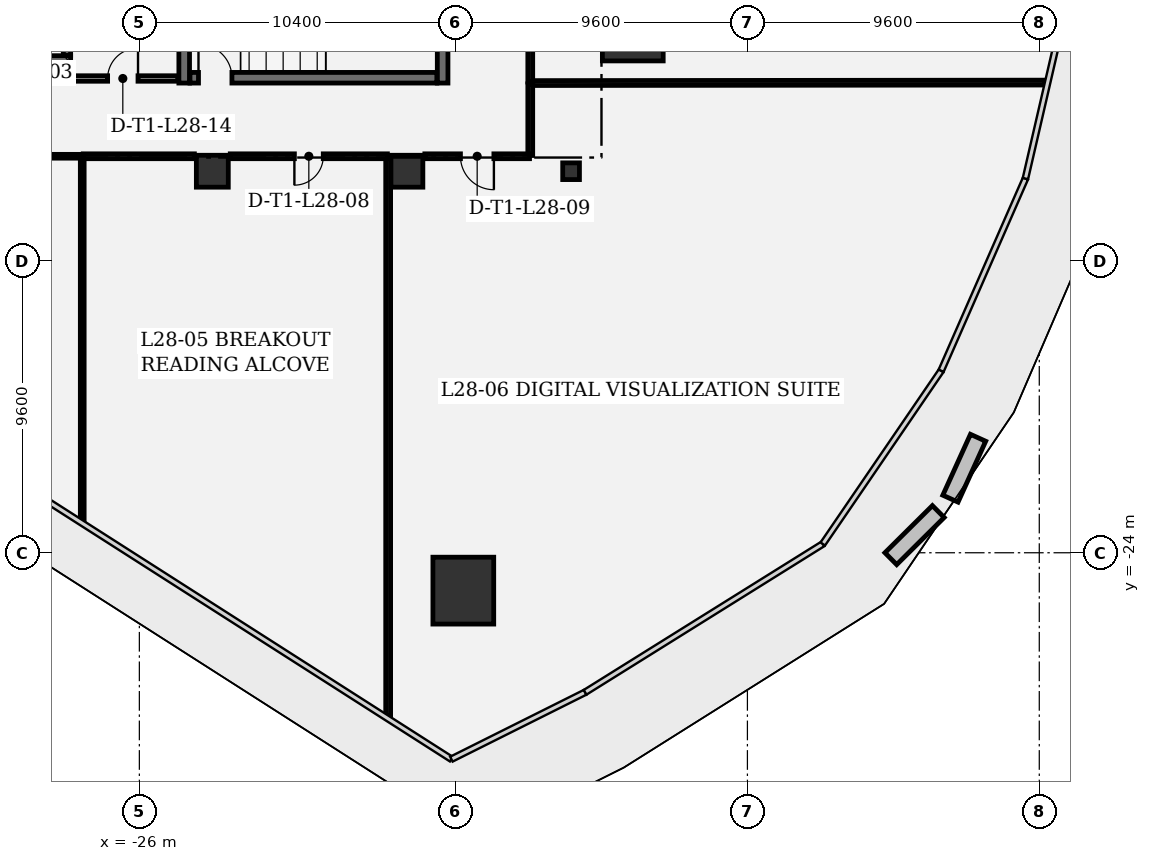
"""IFC4 building model, lengths in metres.
Left out: names, types, materials, properties, quantities, classifications, styles, units other than length and angle.
Written with IfcOpenShell. Run it as: python <this file> out.ifc"""

import sys

from ifc_helpers import new_model, si_unit, direction, frame, frame_2d, origin, origin_2d, place, context, subcontext, project, spatial, rectangle, extrude, element, fill, save


model = new_model("IFC4")
c1 = context("Model", 3, precision=1e-05, world=origin(), true_north=direction((0.0, 1.0)))
c2 = subcontext(c1, "Body", "Model", "MODEL_VIEW")
j1 = project(units=[si_unit("LENGTHUNIT", "METRE"), si_unit("PLANEANGLEUNIT", "RADIAN")], contexts=[c1])
p1 = place(None, origin())
s1 = spatial("IfcSite", under=j1, at=p1, CompositionType="ELEMENT")
p2 = place(p1, origin())
s2 = spatial("IfcBuilding", under=s1, at=p2, CompositionType="ELEMENT")
p3 = place(p2, frame((0.0, 0.0, 126.0)))
s3 = spatial("IfcBuildingStorey", under=s2, at=p3, CompositionType="ELEMENT", Elevation=126.0)
for number, where, z_axis, x_axis in (
    (1, (-15.344, -25.246, 0.0), (0.0, 0.0, 1.0), (1.0, 0.0, 0.0)),
    (2, (-9.77, -6.721, 0.0), (0.0, 0.0, 1.0), (1.0, 0.0, 0.0)),
):
    element("IfcColumn", number, at=place(p3, frame(where, z_axis=z_axis, x_axis=x_axis)), inside=s3, PredefinedType="COLUMN", context=c2, shape_type="SweptSolid", body=[
        extrude(rectangle(XDim=2.0, YDim=2.2, at=origin_2d()), origin(), (0.0, 0.0, 1.0), 4.05),
    ])
for number, where, z_axis, x_axis in (
    (3, (-17.2, -11.45, 0.0), (0.0, 0.0, 1.0), (1.0, 0.0, 0.0)),
    (4, (-23.6, -11.45, 0.0), (0.0, 0.0, 1.0), (1.0, 0.0, 0.0)),
):
    element("IfcColumn", number, at=place(p3, frame(where, z_axis=z_axis, x_axis=x_axis)), inside=s3, PredefinedType="COLUMN", context=c2, shape_type="SweptSolid", body=[
        extrude(rectangle(XDim=1.05, YDim=1.05, at=origin_2d()), origin(), (0.0, 0.0, 1.0), 4.05),
    ])
p4 = place(p3, frame((-11.8, -11.45, 0.0), z_axis=(0.0, 0.0, 1.0), x_axis=(1.0, 0.0, 0.0)))
e5 = element("IfcColumn", 5, at=p4, inside=s3, PredefinedType="COLUMN", context=c2, shape_type="SweptSolid", body=[
    extrude(rectangle(XDim=0.55, YDim=0.55, at=origin_2d()), origin(), (0.0, 0.0, 1.0), 4.05),
])
for number, where, z_axis, x_axis in (
    (6, (-24.525, -4.34, 0.0), (0.0, 0.0, 1.0), (0.0, -1.0, 0.0)),
    (7, (-16.025, -8.55, 0.0), (0.0, 0.0, 1.0), (0.0, 1.0, 0.0)),
):
    element("IfcWall", number, at=place(p3, frame(where, z_axis=z_axis, x_axis=x_axis)), inside=s3, PredefinedType="SHEAR", context=c2, shape_type="SweptSolid", body=[
        extrude(rectangle(XDim=4.21, YDim=0.35, at=frame_2d((2.105, 0.0))), origin(), (0.0, 0.0, 1.0), 3.77),
    ])
p5 = place(p3, frame((-24.335, -8.375, 0.0), z_axis=(0.0, 0.0, 1.0), x_axis=(1.0, 0.0, 0.0)))
e8 = element("IfcWall", 8, at=p5, inside=s3, PredefinedType="SHEAR", context=c2, shape_type="SweptSolid", body=[
    extrude(rectangle(XDim=8.12, YDim=0.35, at=frame_2d((4.06, 0.0))), origin(), (0.0, 0.0, 1.0), 3.77),
])
p6 = place(p5, frame((0.28, 0.0, 0.0)))
e9 = element("IfcOpeningElement", 9, at=p6, cuts=e8, PredefinedType="OPENING", context=c2, shape_type="SweptSolid", body=[
    extrude(rectangle(XDim=1.1, YDim=2.2, at=frame_2d((0.55, 1.1))), frame((0.0, 0.185, 0.0), z_axis=(0.0, -1.0, 0.0), x_axis=(1.0, 0.0, 0.0)), (0.0, 0.0, 1.0), 0.37),
])
p7 = place(p3, frame((-28.26, -7.77, 0.0), z_axis=(0.0, 0.0, 1.0), x_axis=(-1.0, 0.0, 0.0)))
e10 = element("IfcWall", 10, at=p7, inside=s3, PredefinedType="SHEAR", context=c2, shape_type="SweptSolid", body=[
    extrude(rectangle(XDim=2.48, YDim=0.24, at=frame_2d((1.24, 0.0))), origin(), (0.0, 0.0, 1.0), 3.77),
])
p8 = place(p3, frame((-28.38, -5.262, 0.0), z_axis=(0.0, 0.0, 1.0), x_axis=(0.0, -1.0, 0.0)))
e11 = element("IfcWall", 11, at=p8, inside=s3, PredefinedType="SHEAR", context=c2, shape_type="SweptSolid", body=[
    extrude(rectangle(XDim=2.376, YDim=0.24, at=frame_2d((1.188, 0.0))), origin(), (0.0, 0.0, 1.0), 3.77),
])
p9 = place(p8, frame((0.538, 0.0, 0.0)))
e12 = element("IfcOpeningElement", 12, at=p9, cuts=e11, PredefinedType="OPENING", context=c2, shape_type="SweptSolid", body=[
    extrude(rectangle(XDim=1.3, YDim=2.3, at=frame_2d((0.65, 1.15))), frame((0.0, 0.13, 0.0), z_axis=(0.0, -1.0, 0.0), x_axis=(1.0, 0.0, 0.0)), (0.0, 0.0, 1.0), 0.26),
])
p10 = place(p3, frame((-28.355, -8.4, 0.0), z_axis=(0.0, 0.0, 1.0), x_axis=(1.0, 0.0, 0.0)))
e13 = element("IfcWall", 13, at=p10, inside=s3, PredefinedType="PARTITIONING", context=c2, shape_type="SweptSolid", body=[
    extrude(rectangle(XDim=3.622, YDim=0.18, at=frame_2d((1.811, 0.0))), origin(), (0.0, 0.0, 1.0), 3.77),
])
p11 = place(p10, frame((1.311, 0.0, 0.0)))
e14 = element("IfcOpeningElement", 14, at=p11, cuts=e13, PredefinedType="OPENING", context=c2, shape_type="SweptSolid", body=[
    extrude(rectangle(XDim=1.0, YDim=2.15, at=frame_2d((0.5, 1.075))), frame((0.0, 0.1, 0.0), z_axis=(0.0, -1.0, 0.0), x_axis=(1.0, 0.0, 0.0)), (0.0, 0.0, 1.0), 0.2),
])
p12 = place(p3, frame((-27.904, -10.958, 0.0), z_axis=(0.0, 0.0, 1.0), x_axis=(-1.0, 0.0, 0.0)))
e15 = element("IfcWall", 15, at=p12, inside=s3, PredefinedType="PARTITIONING", context=c2, shape_type="SweptSolid", body=[
    extrude(rectangle(XDim=7.679, YDim=0.125, at=frame_2d((3.839, 0.0))), origin(), (0.0, 0.0, 1.0), 3.334),
])
p13 = place(p12, frame((3.365, 0.0, 0.0)))
e16 = element("IfcOpeningElement", 16, at=p13, cuts=e15, PredefinedType="OPENING", context=c2, shape_type="SweptSolid", body=[
    extrude(rectangle(XDim=0.95, YDim=2.15, at=frame_2d((0.475, 1.075))), frame((0.0, 0.073, 0.0), z_axis=(0.0, -1.0, 0.0), x_axis=(1.0, 0.0, 0.0)), (0.0, 0.0, 1.0), 0.145),
])
p14 = place(p3, frame((-27.879, -22.949, 0.0), z_axis=(0.0, 0.0, 1.0), x_axis=(0.0, 1.0, 0.0)))
e17 = element("IfcWall", 17, at=p14, inside=s3, PredefinedType="PARTITIONING", context=c2, shape_type="SweptSolid", body=[
    extrude(rectangle(XDim=11.966, YDim=0.125, at=frame_2d((5.983, 0.0))), origin(), (0.0, 0.0, 1.0), 3.334),
])
p15 = place(p3, frame((-24.19, -10.958, 0.0), z_axis=(0.0, 0.0, 1.0), x_axis=(-1.0, 0.0, 0.0)))
e18 = element("IfcWall", 18, at=p15, inside=s3, PredefinedType="PARTITIONING", context=c2, shape_type="SweptSolid", body=[
    extrude(rectangle(XDim=3.656, YDim=0.16, at=frame_2d((1.828, 0.0))), origin(), (0.0, 0.0, 1.0), 3.77),
])
p16 = place(p3, frame((-17.816, -29.38, 0.0), z_axis=(0.0, 0.0, 1.0), x_axis=(0.0, 1.0, 0.0)))
e19 = element("IfcWall", 19, at=p16, inside=s3, PredefinedType="PARTITIONING", context=c2, shape_type="SweptSolid", body=[
    extrude(rectangle(XDim=18.397, YDim=0.16, at=frame_2d((9.199, 0.0))), origin(), (0.0, 0.0, 1.0), 2.885),
])
p17 = place(p3, frame((-17.841, -10.958, 0.0), z_axis=(0.0, 0.0, 1.0), x_axis=(-1.0, 0.0, 0.0)))
e20 = element("IfcWall", 20, at=p17, inside=s3, PredefinedType="PARTITIONING", context=c2, shape_type="SweptSolid", body=[
    extrude(rectangle(XDim=5.169, YDim=0.16, at=frame_2d((2.584, 0.0))), origin(), (0.0, 0.0, 1.0), 3.77),
])
p18 = place(p17, frame((2.109, 0.0, 0.0)))
e21 = element("IfcOpeningElement", 21, at=p18, cuts=e20, PredefinedType="OPENING", context=c2, shape_type="SweptSolid", body=[
    extrude(rectangle(XDim=0.95, YDim=2.15, at=frame_2d((0.475, 1.075))), frame((0.0, 0.09, 0.0), z_axis=(0.0, -1.0, 0.0), x_axis=(1.0, 0.0, 0.0)), (0.0, 0.0, 1.0), 0.18),
])
p19 = place(p3, frame((3.794, -8.534, 0.0), z_axis=(0.0, 0.0, 1.0), x_axis=(-0.999999573173, -0.000923933833, 0.0)))
e22 = element("IfcWall", 22, at=p19, inside=s3, PredefinedType="PARTITIONING", context=c2, shape_type="SweptSolid", body=[
    extrude(rectangle(XDim=16.911, YDim=0.16, at=frame_2d((8.456, 0.0))), origin(), (0.0, 0.0, 1.0), 2.885),
])
p20 = place(p3, frame((-13.142, -8.575, 0.0), z_axis=(0.0, 0.0, 1.0), x_axis=(0.0, -1.0, 0.0)))
e23 = element("IfcWall", 23, at=p20, inside=s3, PredefinedType="PARTITIONING", context=c2, shape_type="SweptSolid", body=[
    extrude(rectangle(XDim=2.358, YDim=0.16, at=frame_2d((1.179, 0.0))), origin(), (0.0, 0.0, 1.0), 3.77),
])
p21 = place(p3, frame((-13.167, -10.958, 0.0), z_axis=(0.0, 0.0, 1.0), x_axis=(-1.0, 0.0, 0.0)))
e24 = element("IfcWall", 24, at=p21, inside=s3, PredefinedType="PARTITIONING", context=c2, shape_type="SweptSolid", body=[
    extrude(rectangle(XDim=3.443, YDim=0.16, at=frame_2d((1.722, 0.0))), origin(), (0.0, 0.0, 1.0), 2.885),
])
p22 = place(p21, frame((1.172, 0.0, 0.0)))
e25 = element("IfcOpeningElement", 25, at=p22, cuts=e24, PredefinedType="OPENING", context=c2, shape_type="SweptSolid", body=[
    extrude(rectangle(XDim=1.1, YDim=2.15, at=frame_2d((0.55, 1.075))), frame((0.0, 0.09, 0.0), z_axis=(0.0, -1.0, 0.0), x_axis=(1.0, 0.0, 0.0)), (0.0, 0.0, 1.0), 0.18),
])
p23 = place(p3, frame((-13.142, 8.287, 0.0), z_axis=(0.0, 0.0, 1.0), x_axis=(0.0, -1.0, 0.0)))
e26 = element("IfcWall", 26, at=p23, inside=s3, PredefinedType="PARTITIONING", context=c2, shape_type="SweptSolid", body=[
    extrude(rectangle(XDim=16.804, YDim=0.16, at=frame_2d((8.402, 0.0))), origin(), (0.0, 0.0, 1.0), 3.77),
])
p24 = place(p6, origin())
e27 = element("IfcDoor", 27, at=p24, inside=s3, OperationType="SINGLE_SWING_LEFT", PredefinedType="DOOR", context=c2, shape_type="SweptSolid", body=[
    extrude(rectangle(XDim=1.1, YDim=2.2, at=frame_2d((0.55, 1.1))), frame((0.0, 0.025, 0.0), z_axis=(0.0, -1.0, 0.0), x_axis=(1.0, 0.0, 0.0)), (0.0, 0.0, 1.0), 0.05),
])
fill(e9, e27)
p25 = place(p18, origin())
e28 = element("IfcDoor", 28, at=p25, inside=s3, OperationType="SINGLE_SWING_RIGHT", PredefinedType="DOOR", context=c2, shape_type="SweptSolid", body=[
    extrude(rectangle(XDim=0.95, YDim=2.15, at=frame_2d((0.475, 1.075))), frame((0.0, 0.025, 0.0), z_axis=(0.0, -1.0, 0.0), x_axis=(1.0, 0.0, 0.0)), (0.0, 0.0, 1.0), 0.05),
])
fill(e21, e28)
p26 = place(p22, origin())
e29 = element("IfcDoor", 29, at=p26, inside=s3, OperationType="SINGLE_SWING_LEFT", PredefinedType="DOOR", context=c2, shape_type="SweptSolid", body=[
    extrude(rectangle(XDim=1.1, YDim=2.15, at=frame_2d((0.55, 1.075))), frame((0.0, 0.025, 0.0), z_axis=(0.0, -1.0, 0.0), x_axis=(1.0, 0.0, 0.0)), (0.0, 0.0, 1.0), 0.05),
])
fill(e25, e29)
p27 = place(p11, origin())
e30 = element("IfcDoor", 30, at=p27, inside=s3, OperationType="SINGLE_SWING_RIGHT", PredefinedType="DOOR", context=c2, shape_type="SweptSolid", body=[
    extrude(rectangle(XDim=1.0, YDim=2.15, at=frame_2d((0.5, 1.075))), frame((0.0, 0.025, 0.0), z_axis=(0.0, -1.0, 0.0), x_axis=(1.0, 0.0, 0.0)), (0.0, 0.0, 1.0), 0.05),
])
fill(e14, e30)
save(model, sys.argv[1])
